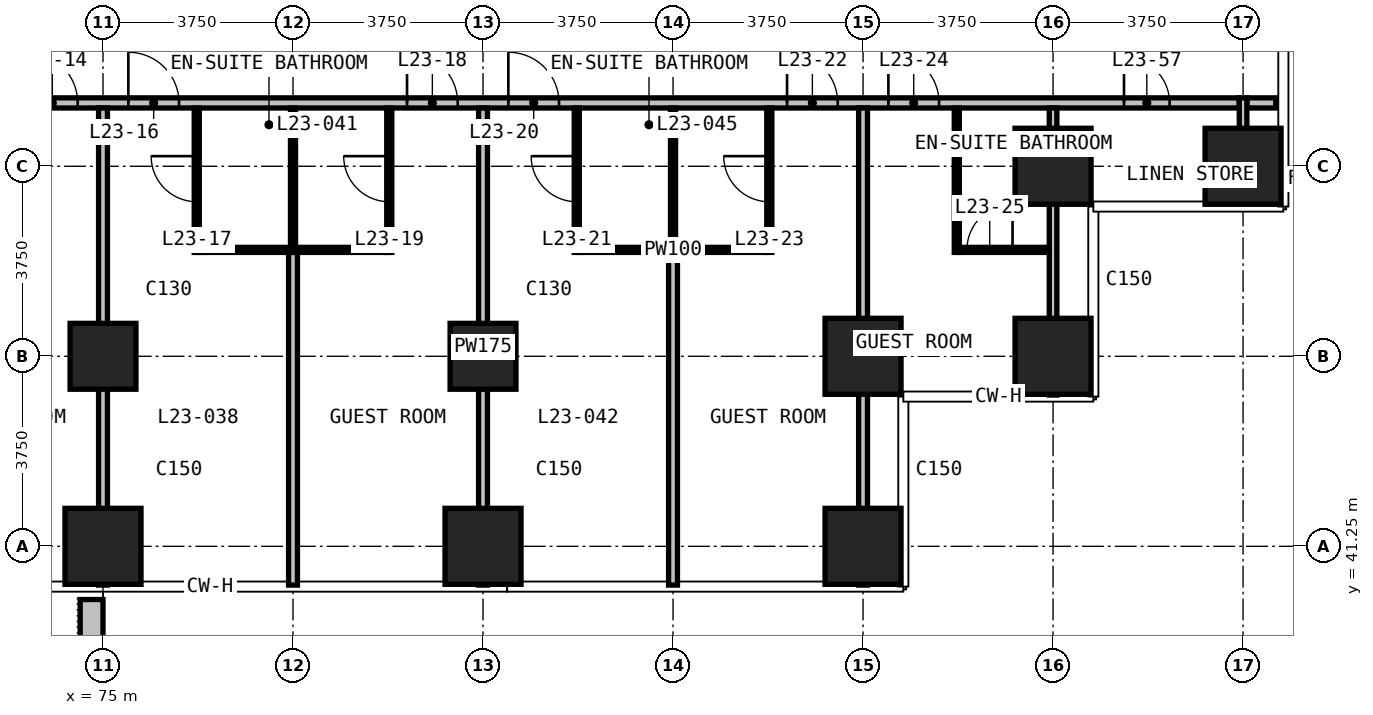
"""IFC4 building model, lengths in metres.
Left out: names, types, materials, properties, quantities, classifications, styles, units other than length and angle.
Written with IfcOpenShell. Run it as: python <this file> out.ifc"""

import sys

from ifc_helpers import new_model, si_unit, direction, frame, frame_2d, origin, origin_2d, place, context, subcontext, project, spatial, rectangle, extrude, element, fill, save


model = new_model("IFC4")
c1 = context("Model", 3, precision=1e-05, world=origin(), true_north=direction((0.0, 1.0)))
c2 = subcontext(c1, "Body", "Model", "MODEL_VIEW")
j1 = project(units=[si_unit("LENGTHUNIT", "METRE"), si_unit("PLANEANGLEUNIT", "RADIAN")], contexts=[c1])
p1 = place(None, origin())
s1 = spatial("IfcSite", under=j1, at=p1, CompositionType="ELEMENT")
p2 = place(p1, origin())
s2 = spatial("IfcBuilding", under=s1, at=p2, CompositionType="ELEMENT")
p3 = place(p2, frame((0.0, 0.0, 95.6)))
s3 = spatial("IfcBuildingStorey", under=s2, at=p3, CompositionType="ELEMENT", Elevation=95.6)
p4 = place(p3, frame((75.0, 41.25, 0.0), z_axis=(0.0, 0.0, 1.0), x_axis=(1.0, 0.0, 0.0)))
e1 = element("IfcColumn", 1, at=p4, inside=s3, PredefinedType="COLUMN", context=c2, shape_type="SweptSolid", body=[
    extrude(rectangle(XDim=1.5, YDim=1.5, at=origin_2d()), origin(), (0.0, 0.0, 1.0), 3.3),
])
p5 = place(p3, frame((75.0, 45.0, 0.0), z_axis=(0.0, 0.0, 1.0), x_axis=(1.0, 0.0, 0.0)))
e2 = element("IfcColumn", 2, at=p5, inside=s3, PredefinedType="COLUMN", context=c2, shape_type="SweptSolid", body=[
    extrude(rectangle(XDim=1.3, YDim=1.3, at=origin_2d()), origin(), (0.0, 0.0, 1.0), 3.3),
])
p6 = place(p3, frame((82.5, 41.25, 0.0), z_axis=(0.0, 0.0, 1.0), x_axis=(1.0, 0.0, 0.0)))
e3 = element("IfcColumn", 3, at=p6, inside=s3, PredefinedType="COLUMN", context=c2, shape_type="SweptSolid", body=[
    extrude(rectangle(XDim=1.5, YDim=1.5, at=origin_2d()), origin(), (0.0, 0.0, 1.0), 3.3),
])
p7 = place(p3, frame((82.5, 45.0, 0.0), z_axis=(0.0, 0.0, 1.0), x_axis=(1.0, 0.0, 0.0)))
e4 = element("IfcColumn", 4, at=p7, inside=s3, PredefinedType="COLUMN", context=c2, shape_type="SweptSolid", body=[
    extrude(rectangle(XDim=1.3, YDim=1.3, at=origin_2d()), origin(), (0.0, 0.0, 1.0), 3.3),
])
for number, where, z_axis, x_axis in (
    (5, (90.0, 41.25, 0.0), (0.0, 0.0, 1.0), (1.0, 0.0, 0.0)),
    (6, (90.0, 45.0, 0.0), (0.0, 0.0, 1.0), (1.0, 0.0, 0.0)),
    (7, (93.75, 45.0, 0.0), (0.0, 0.0, 1.0), (1.0, 0.0, 0.0)),
    (8, (93.75, 48.75, 0.0), (0.0, 0.0, 1.0), (1.0, 0.0, 0.0)),
    (9, (97.5, 48.75, 0.0), (0.0, 0.0, 1.0), (1.0, 0.0, 0.0)),
):
    element("IfcColumn", number, at=place(p3, frame(where, z_axis=z_axis, x_axis=x_axis)), inside=s3, PredefinedType="COLUMN", context=c2, shape_type="SweptSolid", body=[
        extrude(rectangle(XDim=1.5, YDim=1.5, at=origin_2d()), origin(), (0.0, 0.0, 1.0), 3.3),
    ])
p8 = place(p3, frame((74.775, 40.2, 0.0), z_axis=(0.0, 0.0, 1.0), x_axis=(0.0, -1.0, 0.0)))
e10 = element("IfcWall", 10, at=p8, inside=s3, PredefinedType="USERDEFINED", context=c2, shape_type="SweptSolid", body=[
    extrude(rectangle(XDim=2.35, YDim=0.45, at=frame_2d((1.175, 0.0))), origin(), (0.0, 0.0, 1.0), 1.1),
])
p9 = place(p3, frame((52.575, 50.0, 0.0), z_axis=(0.0, 0.0, 1.0), x_axis=(1.0, 0.0, 0.0)))
e11 = element("IfcWall", 11, at=p9, inside=s3, PredefinedType="PARTITIONING", context=c2, shape_type="SweptSolid", body=[
    extrude(rectangle(XDim=44.85, YDim=0.2, at=frame_2d((22.425, 0.0))), origin(), (0.0, 0.0, 1.0), 3.0),
])
p10 = place(p9, frame((5.925, 0.0, 0.0)))
e12 = element("IfcOpeningElement", 12, at=p10, cuts=e11, PredefinedType="OPENING", context=c2, shape_type="SweptSolid", body=[
    extrude(rectangle(XDim=1.0, YDim=2.2, at=frame_2d((0.5, 1.1))), frame((0.0, 0.11, 0.0), z_axis=(0.0, -1.0, 0.0), x_axis=(1.0, 0.0, 0.0)), (0.0, 0.0, 1.0), 0.22),
])
p11 = place(p9, frame((7.925, 0.0, 0.0)))
e13 = element("IfcOpeningElement", 13, at=p11, cuts=e11, PredefinedType="OPENING", context=c2, shape_type="SweptSolid", body=[
    extrude(rectangle(XDim=1.0, YDim=2.2, at=frame_2d((0.5, 1.1))), frame((0.0, 0.11, 0.0), z_axis=(0.0, -1.0, 0.0), x_axis=(1.0, 0.0, 0.0)), (0.0, 0.0, 1.0), 0.22),
])
p12 = place(p9, frame((13.425, 0.0, 0.0)))
e14 = element("IfcOpeningElement", 14, at=p12, cuts=e11, PredefinedType="OPENING", context=c2, shape_type="SweptSolid", body=[
    extrude(rectangle(XDim=1.0, YDim=2.2, at=frame_2d((0.5, 1.1))), frame((0.0, 0.11, 0.0), z_axis=(0.0, -1.0, 0.0), x_axis=(1.0, 0.0, 0.0)), (0.0, 0.0, 1.0), 0.22),
])
p13 = place(p9, frame((15.425, 0.0, 0.0)))
e15 = element("IfcOpeningElement", 15, at=p13, cuts=e11, PredefinedType="OPENING", context=c2, shape_type="SweptSolid", body=[
    extrude(rectangle(XDim=1.0, YDim=2.2, at=frame_2d((0.5, 1.1))), frame((0.0, 0.11, 0.0), z_axis=(0.0, -1.0, 0.0), x_axis=(1.0, 0.0, 0.0)), (0.0, 0.0, 1.0), 0.22),
])
p14 = place(p9, frame((20.925, 0.0, 0.0)))
e16 = element("IfcOpeningElement", 16, at=p14, cuts=e11, PredefinedType="OPENING", context=c2, shape_type="SweptSolid", body=[
    extrude(rectangle(XDim=1.0, YDim=2.2, at=frame_2d((0.5, 1.1))), frame((0.0, 0.11, 0.0), z_axis=(0.0, -1.0, 0.0), x_axis=(1.0, 0.0, 0.0)), (0.0, 0.0, 1.0), 0.22),
])
p15 = place(p9, frame((22.925, 0.0, 0.0)))
e17 = element("IfcOpeningElement", 17, at=p15, cuts=e11, PredefinedType="OPENING", context=c2, shape_type="SweptSolid", body=[
    extrude(rectangle(XDim=1.0, YDim=2.2, at=frame_2d((0.5, 1.1))), frame((0.0, 0.11, 0.0), z_axis=(0.0, -1.0, 0.0), x_axis=(1.0, 0.0, 0.0)), (0.0, 0.0, 1.0), 0.22),
])
p16 = place(p9, frame((28.425, 0.0, 0.0)))
e18 = element("IfcOpeningElement", 18, at=p16, cuts=e11, PredefinedType="OPENING", context=c2, shape_type="SweptSolid", body=[
    extrude(rectangle(XDim=1.0, YDim=2.2, at=frame_2d((0.5, 1.1))), frame((0.0, 0.11, 0.0), z_axis=(0.0, -1.0, 0.0), x_axis=(1.0, 0.0, 0.0)), (0.0, 0.0, 1.0), 0.22),
])
p17 = place(p9, frame((30.425, 0.0, 0.0)))
e19 = element("IfcOpeningElement", 19, at=p17, cuts=e11, PredefinedType="OPENING", context=c2, shape_type="SweptSolid", body=[
    extrude(rectangle(XDim=1.0, YDim=2.2, at=frame_2d((0.5, 1.1))), frame((0.0, 0.11, 0.0), z_axis=(0.0, -1.0, 0.0), x_axis=(1.0, 0.0, 0.0)), (0.0, 0.0, 1.0), 0.22),
])
p18 = place(p9, frame((35.925, 0.0, 0.0)))
e20 = element("IfcOpeningElement", 20, at=p18, cuts=e11, PredefinedType="OPENING", context=c2, shape_type="SweptSolid", body=[
    extrude(rectangle(XDim=1.0, YDim=2.2, at=frame_2d((0.5, 1.1))), frame((0.0, 0.11, 0.0), z_axis=(0.0, -1.0, 0.0), x_axis=(1.0, 0.0, 0.0)), (0.0, 0.0, 1.0), 0.22),
])
p19 = place(p9, frame((37.925, 0.0, 0.0)))
e21 = element("IfcOpeningElement", 21, at=p19, cuts=e11, PredefinedType="OPENING", context=c2, shape_type="SweptSolid", body=[
    extrude(rectangle(XDim=1.0, YDim=2.2, at=frame_2d((0.5, 1.1))), frame((0.0, 0.11, 0.0), z_axis=(0.0, -1.0, 0.0), x_axis=(1.0, 0.0, 0.0)), (0.0, 0.0, 1.0), 0.22),
])
p20 = place(p9, frame((1.4, 0.0, 0.0)))
e22 = element("IfcOpeningElement", 22, at=p20, cuts=e11, PredefinedType="OPENING", context=c2, shape_type="SweptSolid", body=[
    extrude(rectangle(XDim=0.9, YDim=2.2, at=frame_2d((0.45, 1.1))), frame((0.0, 0.11, 0.0), z_axis=(0.0, -1.0, 0.0), x_axis=(1.0, 0.0, 0.0)), (0.0, 0.0, 1.0), 0.22),
])
p21 = place(p9, frame((42.575, 0.0, 0.0)))
e23 = element("IfcOpeningElement", 23, at=p21, cuts=e11, PredefinedType="OPENING", context=c2, shape_type="SweptSolid", body=[
    extrude(rectangle(XDim=0.9, YDim=2.2, at=frame_2d((0.45, 1.1))), frame((0.0, 0.11, 0.0), z_axis=(0.0, -1.0, 0.0), x_axis=(1.0, 0.0, 0.0)), (0.0, 0.0, 1.0), 0.22),
])
p22 = place(p3, frame((97.575, 50.0, 0.0), z_axis=(0.0, 0.0, 1.0), x_axis=(1.0, 0.0, 0.0)))
e24 = element("IfcWall", 24, at=p22, inside=s3, PredefinedType="PARTITIONING", context=c2, shape_type="SweptSolid", body=[
    extrude(rectangle(XDim=0.57, YDim=0.2, at=frame_2d((0.285, 0.0))), origin(), (0.0, 0.0, 1.0), 3.0),
])
p23 = place(p3, frame((75.0, 40.485, 0.0), z_axis=(0.0, 0.0, 1.0), x_axis=(0.0, 1.0, 0.0)))
e25 = element("IfcWall", 25, at=p23, inside=s3, PredefinedType="PARTITIONING", context=c2, shape_type="SweptSolid", body=[
    extrude(rectangle(XDim=9.415, YDim=0.175, at=frame_2d((4.708, 0.0))), origin(), (0.0, 0.0, 1.0), 3.0),
])
p24 = place(p3, frame((78.75, 40.485, 0.0), z_axis=(0.0, 0.0, 1.0), x_axis=(0.0, 1.0, 0.0)))
e26 = element("IfcWall", 26, at=p24, inside=s3, PredefinedType="PARTITIONING", context=c2, shape_type="SweptSolid", body=[
    extrude(rectangle(XDim=6.565, YDim=0.175, at=frame_2d((3.282, 0.0))), origin(), (0.0, 0.0, 1.0), 3.0),
])
p25 = place(p3, frame((82.5, 40.485, 0.0), z_axis=(0.0, 0.0, 1.0), x_axis=(0.0, 1.0, 0.0)))
e27 = element("IfcWall", 27, at=p25, inside=s3, PredefinedType="PARTITIONING", context=c2, shape_type="SweptSolid", body=[
    extrude(rectangle(XDim=9.415, YDim=0.175, at=frame_2d((4.708, 0.0))), origin(), (0.0, 0.0, 1.0), 3.0),
])
p26 = place(p3, frame((86.25, 40.485, 0.0), z_axis=(0.0, 0.0, 1.0), x_axis=(0.0, 1.0, 0.0)))
e28 = element("IfcWall", 28, at=p26, inside=s3, PredefinedType="PARTITIONING", context=c2, shape_type="SweptSolid", body=[
    extrude(rectangle(XDim=6.565, YDim=0.175, at=frame_2d((3.282, 0.0))), origin(), (0.0, 0.0, 1.0), 3.0),
])
p27 = place(p3, frame((90.0, 40.485, 0.0), z_axis=(0.0, 0.0, 1.0), x_axis=(0.0, 1.0, 0.0)))
e29 = element("IfcWall", 29, at=p27, inside=s3, PredefinedType="PARTITIONING", context=c2, shape_type="SweptSolid", body=[
    extrude(rectangle(XDim=9.415, YDim=0.175, at=frame_2d((4.708, 0.0))), origin(), (0.0, 0.0, 1.0), 3.0),
])
p28 = place(p3, frame((93.75, 44.235, 0.0), z_axis=(0.0, 0.0, 1.0), x_axis=(0.0, 1.0, 0.0)))
e30 = element("IfcWall", 30, at=p28, inside=s3, PredefinedType="PARTITIONING", context=c2, shape_type="SweptSolid", body=[
    extrude(rectangle(XDim=5.665, YDim=0.15, at=frame_2d((2.833, 0.0))), origin(), (0.0, 0.0, 1.0), 3.0),
])
p29 = place(p3, frame((97.5, 48.105, 0.0), z_axis=(0.0, 0.0, 1.0), x_axis=(0.0, 1.0, 0.0)))
e31 = element("IfcWall", 31, at=p29, inside=s3, PredefinedType="PARTITIONING", context=c2, shape_type="SweptSolid", body=[
    extrude(rectangle(XDim=1.995, YDim=0.15, at=frame_2d((0.998, 0.0))), origin(), (0.0, 0.0, 1.0), 3.0),
])
for number, where, z_axis, x_axis in (
    (32, (76.9, 47.1, 0.0), (0.0, 0.0, 1.0), (1.0, 0.0, 0.0)),
    (33, (84.4, 47.1, 0.0), (0.0, 0.0, 1.0), (1.0, 0.0, 0.0)),
):
    element("IfcWall", number, at=place(p3, frame(where, z_axis=z_axis, x_axis=x_axis)), inside=s3, PredefinedType="PARTITIONING", context=c2, shape_type="SweptSolid", body=[
        extrude(rectangle(XDim=3.7, YDim=0.1, at=frame_2d((1.85, 0.0))), origin(), (0.0, 0.0, 1.0), 3.0),
    ])
p30 = place(p3, frame((91.9, 47.1, 0.0), z_axis=(0.0, 0.0, 1.0), x_axis=(1.0, 0.0, 0.0)))
e34 = element("IfcWall", 34, at=p30, inside=s3, PredefinedType="PARTITIONING", context=c2, shape_type="SweptSolid", body=[
    extrude(rectangle(XDim=1.775, YDim=0.1, at=frame_2d((0.888, 0.0))), origin(), (0.0, 0.0, 1.0), 3.0),
])
p31 = place(p30, frame((0.15, 0.0, 0.0)))
e35 = element("IfcOpeningElement", 35, at=p31, cuts=e34, PredefinedType="OPENING", context=c2, shape_type="SweptSolid", body=[
    extrude(rectangle(XDim=0.9, YDim=2.2, at=frame_2d((0.45, 1.1))), frame((0.0, 0.06, 0.0), z_axis=(0.0, -1.0, 0.0), x_axis=(1.0, 0.0, 0.0)), (0.0, 0.0, 1.0), 0.12),
])
p32 = place(p3, frame((76.85, 47.05, 0.0), z_axis=(0.0, 0.0, 1.0), x_axis=(0.0, 1.0, 0.0)))
e36 = element("IfcWall", 36, at=p32, inside=s3, PredefinedType="PARTITIONING", context=c2, shape_type="SweptSolid", body=[
    extrude(rectangle(XDim=2.85, YDim=0.1, at=frame_2d((1.425, 0.0))), origin(), (0.0, 0.0, 1.0), 3.0),
])
p33 = place(p32, frame((1.0, 0.0, 0.0)))
e37 = element("IfcOpeningElement", 37, at=p33, cuts=e36, PredefinedType="OPENING", context=c2, shape_type="SweptSolid", body=[
    extrude(rectangle(XDim=0.9, YDim=2.2, at=frame_2d((0.45, 1.1))), frame((0.0, 0.06, 0.0), z_axis=(0.0, -1.0, 0.0), x_axis=(1.0, 0.0, 0.0)), (0.0, 0.0, 1.0), 0.12),
])
p34 = place(p3, frame((78.75, 47.15, 0.0), z_axis=(0.0, 0.0, 1.0), x_axis=(0.0, 1.0, 0.0)))
e38 = element("IfcWall", 38, at=p34, inside=s3, PredefinedType="PARTITIONING", context=c2, shape_type="SweptSolid", body=[
    extrude(rectangle(XDim=2.75, YDim=0.1, at=frame_2d((1.375, 0.0))), origin(), (0.0, 0.0, 1.0), 3.0),
])
p35 = place(p3, frame((80.65, 47.05, 0.0), z_axis=(0.0, 0.0, 1.0), x_axis=(0.0, 1.0, 0.0)))
e39 = element("IfcWall", 39, at=p35, inside=s3, PredefinedType="PARTITIONING", context=c2, shape_type="SweptSolid", body=[
    extrude(rectangle(XDim=2.85, YDim=0.1, at=frame_2d((1.425, 0.0))), origin(), (0.0, 0.0, 1.0), 3.0),
])
p36 = place(p35, frame((1.0, 0.0, 0.0)))
e40 = element("IfcOpeningElement", 40, at=p36, cuts=e39, PredefinedType="OPENING", context=c2, shape_type="SweptSolid", body=[
    extrude(rectangle(XDim=0.9, YDim=2.2, at=frame_2d((0.45, 1.1))), frame((0.0, 0.06, 0.0), z_axis=(0.0, -1.0, 0.0), x_axis=(1.0, 0.0, 0.0)), (0.0, 0.0, 1.0), 0.12),
])
p37 = place(p3, frame((84.35, 47.05, 0.0), z_axis=(0.0, 0.0, 1.0), x_axis=(0.0, 1.0, 0.0)))
e41 = element("IfcWall", 41, at=p37, inside=s3, PredefinedType="PARTITIONING", context=c2, shape_type="SweptSolid", body=[
    extrude(rectangle(XDim=2.85, YDim=0.1, at=frame_2d((1.425, 0.0))), origin(), (0.0, 0.0, 1.0), 3.0),
])
p38 = place(p37, frame((1.0, 0.0, 0.0)))
e42 = element("IfcOpeningElement", 42, at=p38, cuts=e41, PredefinedType="OPENING", context=c2, shape_type="SweptSolid", body=[
    extrude(rectangle(XDim=0.9, YDim=2.2, at=frame_2d((0.45, 1.1))), frame((0.0, 0.06, 0.0), z_axis=(0.0, -1.0, 0.0), x_axis=(1.0, 0.0, 0.0)), (0.0, 0.0, 1.0), 0.12),
])
p39 = place(p3, frame((86.25, 47.15, 0.0), z_axis=(0.0, 0.0, 1.0), x_axis=(0.0, 1.0, 0.0)))
e43 = element("IfcWall", 43, at=p39, inside=s3, PredefinedType="PARTITIONING", context=c2, shape_type="SweptSolid", body=[
    extrude(rectangle(XDim=2.75, YDim=0.1, at=frame_2d((1.375, 0.0))), origin(), (0.0, 0.0, 1.0), 3.0),
])
p40 = place(p3, frame((88.15, 47.05, 0.0), z_axis=(0.0, 0.0, 1.0), x_axis=(0.0, 1.0, 0.0)))
e44 = element("IfcWall", 44, at=p40, inside=s3, PredefinedType="PARTITIONING", context=c2, shape_type="SweptSolid", body=[
    extrude(rectangle(XDim=2.85, YDim=0.1, at=frame_2d((1.425, 0.0))), origin(), (0.0, 0.0, 1.0), 3.0),
])
p41 = place(p40, frame((1.0, 0.0, 0.0)))
e45 = element("IfcOpeningElement", 45, at=p41, cuts=e44, PredefinedType="OPENING", context=c2, shape_type="SweptSolid", body=[
    extrude(rectangle(XDim=0.9, YDim=2.2, at=frame_2d((0.45, 1.1))), frame((0.0, 0.06, 0.0), z_axis=(0.0, -1.0, 0.0), x_axis=(1.0, 0.0, 0.0)), (0.0, 0.0, 1.0), 0.12),
])
p42 = place(p3, frame((91.85, 47.05, 0.0), z_axis=(0.0, 0.0, 1.0), x_axis=(0.0, 1.0, 0.0)))
e46 = element("IfcWall", 46, at=p42, inside=s3, PredefinedType="PARTITIONING", context=c2, shape_type="SweptSolid", body=[
    extrude(rectangle(XDim=2.85, YDim=0.1, at=frame_2d((1.425, 0.0))), origin(), (0.0, 0.0, 1.0), 3.0),
])
p43 = place(p14, origin())
e47 = element("IfcDoor", 47, at=p43, inside=s3, OperationType="SINGLE_SWING_LEFT", PredefinedType="DOOR", context=c2, shape_type="SweptSolid", body=[
    extrude(rectangle(XDim=1.0, YDim=2.2, at=frame_2d((0.5, 1.1))), frame((0.0, 0.025, 0.0), z_axis=(0.0, -1.0, 0.0), x_axis=(1.0, 0.0, 0.0)), (0.0, 0.0, 1.0), 0.05),
])
fill(e16, e47)
p44 = place(p15, origin())
e48 = element("IfcDoor", 48, at=p44, inside=s3, OperationType="SINGLE_SWING_RIGHT", PredefinedType="DOOR", context=c2, shape_type="SweptSolid", body=[
    extrude(rectangle(XDim=1.0, YDim=2.2, at=frame_2d((0.5, 1.1))), frame((0.0, 0.025, 0.0), z_axis=(0.0, -1.0, 0.0), x_axis=(1.0, 0.0, 0.0)), (0.0, 0.0, 1.0), 0.05),
])
fill(e17, e48)
p45 = place(p33, origin())
e49 = element("IfcDoor", 49, at=p45, inside=s3, OperationType="SINGLE_SWING_RIGHT", PredefinedType="DOOR", context=c2, shape_type="SweptSolid", body=[
    extrude(rectangle(XDim=0.9, YDim=2.2, at=frame_2d((0.45, 1.1))), frame((0.0, 0.025, 0.0), z_axis=(0.0, -1.0, 0.0), x_axis=(1.0, 0.0, 0.0)), (0.0, 0.0, 1.0), 0.05),
])
fill(e37, e49)
p46 = place(p16, origin())
e50 = element("IfcDoor", 50, at=p46, inside=s3, OperationType="SINGLE_SWING_LEFT", PredefinedType="DOOR", context=c2, shape_type="SweptSolid", body=[
    extrude(rectangle(XDim=1.0, YDim=2.2, at=frame_2d((0.5, 1.1))), frame((0.0, 0.025, 0.0), z_axis=(0.0, -1.0, 0.0), x_axis=(1.0, 0.0, 0.0)), (0.0, 0.0, 1.0), 0.05),
])
fill(e18, e50)
p47 = place(p36, origin())
e51 = element("IfcDoor", 51, at=p47, inside=s3, OperationType="SINGLE_SWING_RIGHT", PredefinedType="DOOR", context=c2, shape_type="SweptSolid", body=[
    extrude(rectangle(XDim=0.9, YDim=2.2, at=frame_2d((0.45, 1.1))), frame((0.0, 0.025, 0.0), z_axis=(0.0, -1.0, 0.0), x_axis=(1.0, 0.0, 0.0)), (0.0, 0.0, 1.0), 0.05),
])
fill(e40, e51)
p48 = place(p17, origin())
e52 = element("IfcDoor", 52, at=p48, inside=s3, OperationType="SINGLE_SWING_LEFT", PredefinedType="DOOR", context=c2, shape_type="SweptSolid", body=[
    extrude(rectangle(XDim=1.0, YDim=2.2, at=frame_2d((0.5, 1.1))), frame((0.0, 0.025, 0.0), z_axis=(0.0, -1.0, 0.0), x_axis=(1.0, 0.0, 0.0)), (0.0, 0.0, 1.0), 0.05),
])
fill(e19, e52)
p49 = place(p38, origin())
e53 = element("IfcDoor", 53, at=p49, inside=s3, OperationType="SINGLE_SWING_RIGHT", PredefinedType="DOOR", context=c2, shape_type="SweptSolid", body=[
    extrude(rectangle(XDim=0.9, YDim=2.2, at=frame_2d((0.45, 1.1))), frame((0.0, 0.025, 0.0), z_axis=(0.0, -1.0, 0.0), x_axis=(1.0, 0.0, 0.0)), (0.0, 0.0, 1.0), 0.05),
])
fill(e42, e53)
p50 = place(p18, origin())
e54 = element("IfcDoor", 54, at=p50, inside=s3, OperationType="SINGLE_SWING_RIGHT", PredefinedType="DOOR", context=c2, shape_type="SweptSolid", body=[
    extrude(rectangle(XDim=1.0, YDim=2.2, at=frame_2d((0.5, 1.1))), frame((0.0, 0.025, 0.0), z_axis=(0.0, -1.0, 0.0), x_axis=(1.0, 0.0, 0.0)), (0.0, 0.0, 1.0), 0.05),
])
fill(e20, e54)
p51 = place(p41, origin())
e55 = element("IfcDoor", 55, at=p51, inside=s3, OperationType="SINGLE_SWING_RIGHT", PredefinedType="DOOR", context=c2, shape_type="SweptSolid", body=[
    extrude(rectangle(XDim=0.9, YDim=2.2, at=frame_2d((0.45, 1.1))), frame((0.0, 0.025, 0.0), z_axis=(0.0, -1.0, 0.0), x_axis=(1.0, 0.0, 0.0)), (0.0, 0.0, 1.0), 0.05),
])
fill(e45, e55)
p52 = place(p19, origin())
e56 = element("IfcDoor", 56, at=p52, inside=s3, OperationType="SINGLE_SWING_LEFT", PredefinedType="DOOR", context=c2, shape_type="SweptSolid", body=[
    extrude(rectangle(XDim=1.0, YDim=2.2, at=frame_2d((0.5, 1.1))), frame((0.0, 0.025, 0.0), z_axis=(0.0, -1.0, 0.0), x_axis=(1.0, 0.0, 0.0)), (0.0, 0.0, 1.0), 0.05),
])
fill(e21, e56)
p53 = place(p31, origin())
e57 = element("IfcDoor", 57, at=p53, inside=s3, OperationType="SINGLE_SWING_RIGHT", PredefinedType="DOOR", context=c2, shape_type="SweptSolid", body=[
    extrude(rectangle(XDim=0.9, YDim=2.2, at=frame_2d((0.45, 1.1))), frame((0.0, 0.025, 0.0), z_axis=(0.0, -1.0, 0.0), x_axis=(1.0, 0.0, 0.0)), (0.0, 0.0, 1.0), 0.05),
])
fill(e35, e57)
p54 = place(p21, origin())
e58 = element("IfcDoor", 58, at=p54, inside=s3, OperationType="SINGLE_SWING_LEFT", PredefinedType="DOOR", context=c2, shape_type="SweptSolid", body=[
    extrude(rectangle(XDim=0.9, YDim=2.2, at=frame_2d((0.45, 1.1))), frame((0.0, 0.025, 0.0), z_axis=(0.0, -1.0, 0.0), x_axis=(1.0, 0.0, 0.0)), (0.0, 0.0, 1.0), 0.05),
])
fill(e23, e58)
save(model, sys.argv[1])
